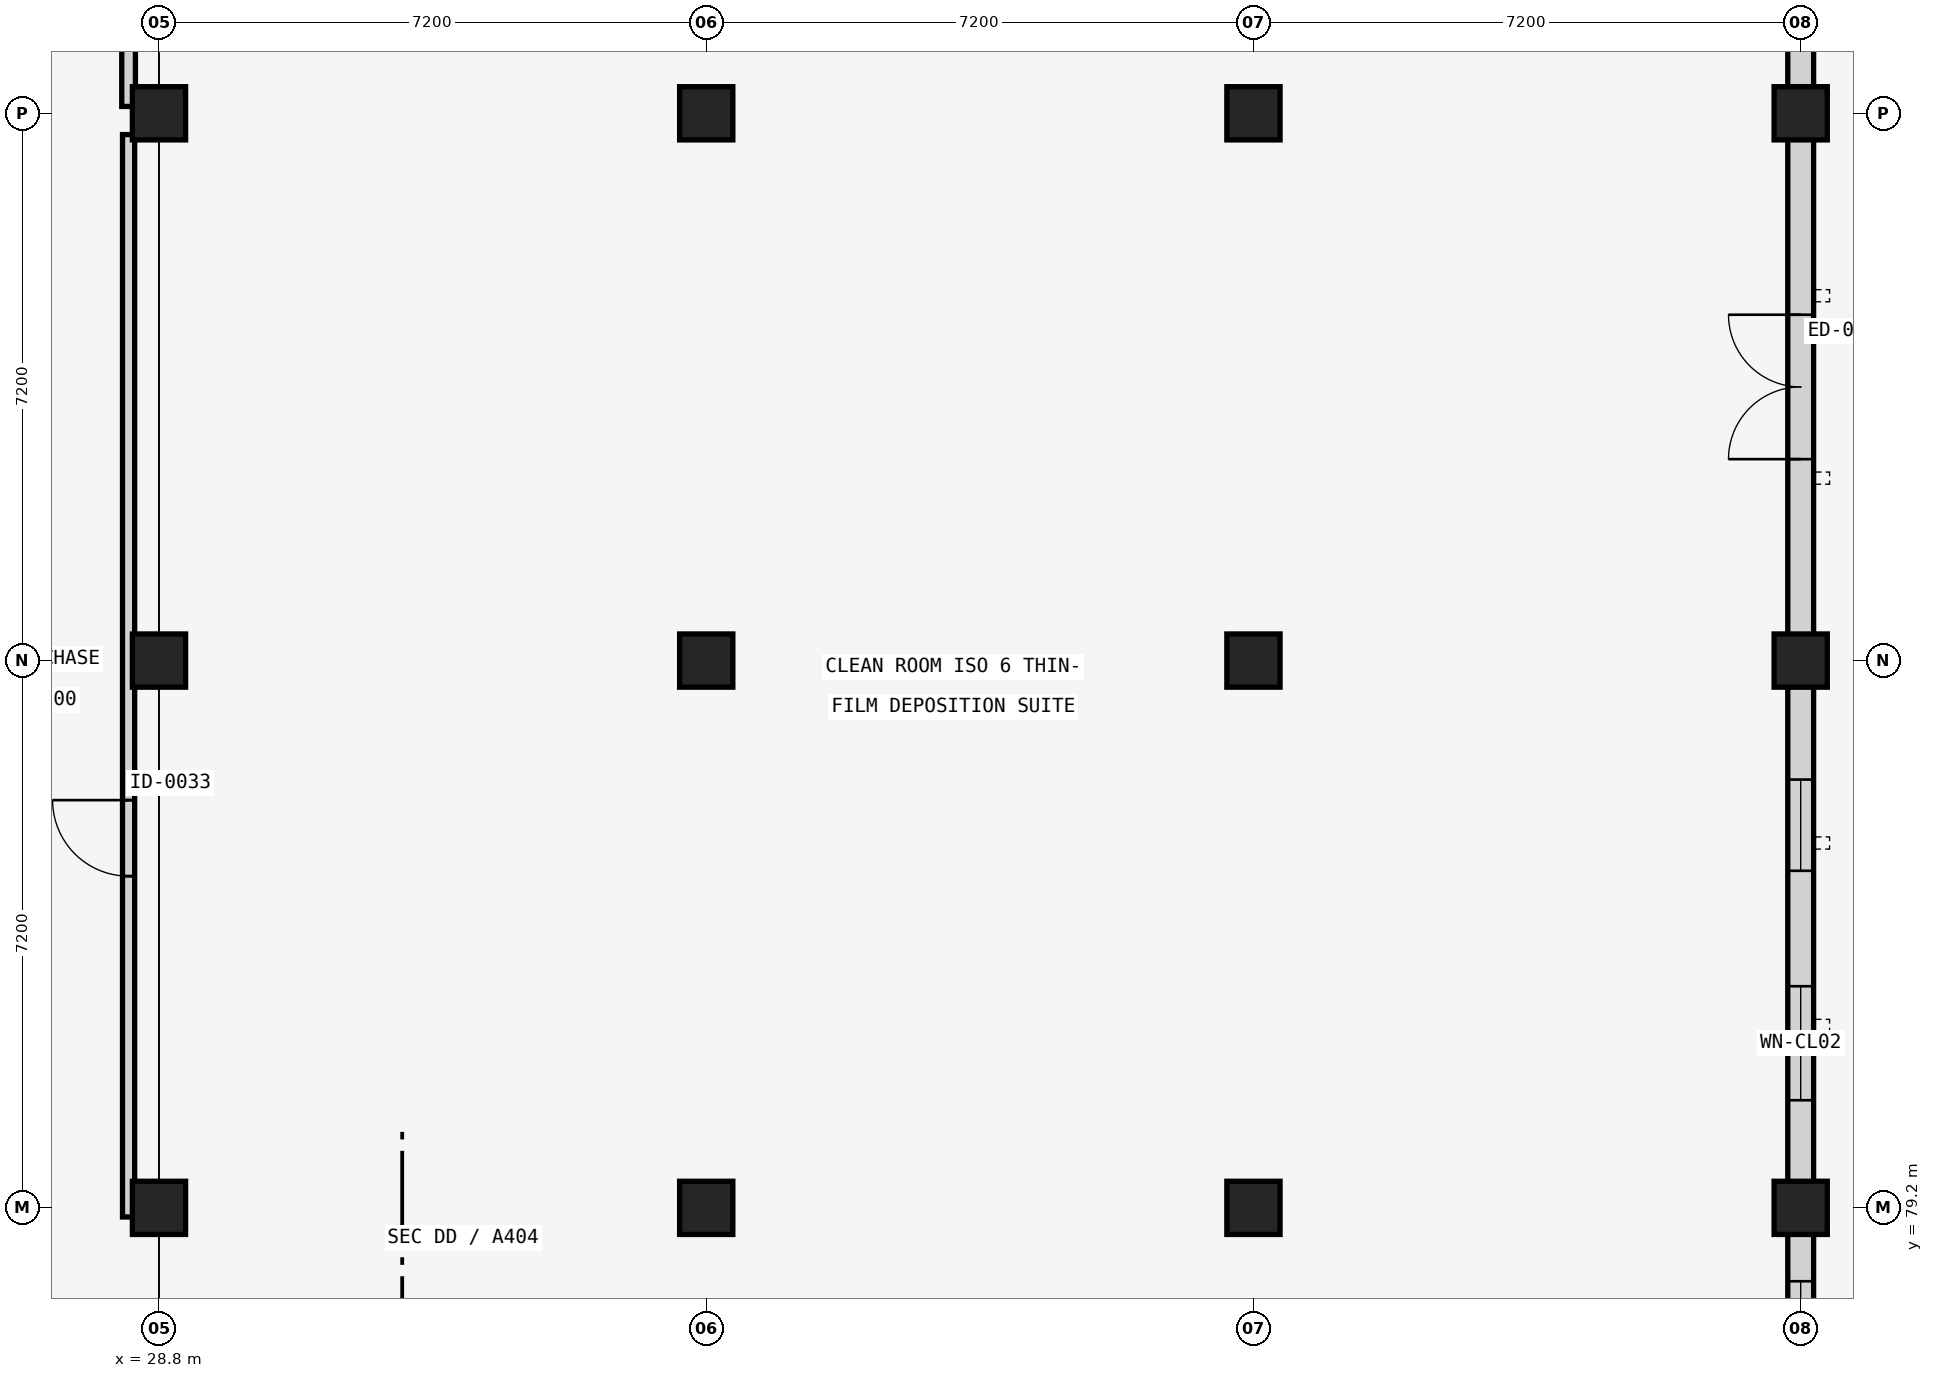
"""IFC4 building model, lengths in metres.
Left out: names, types, materials, properties, quantities, classifications, styles, units other than length and angle.
Written with IfcOpenShell. Run it as: python <this file> out.ifc"""

import sys

from ifc_helpers import new_model, si_unit, direction, frame, frame_2d, origin, origin_2d, place, context, subcontext, project, spatial, rectangle, extrude, element, fill, save


model = new_model("IFC4")
c1 = context("Model", 3, precision=1e-05, world=origin(), true_north=direction((0.0, 1.0)))
c2 = subcontext(c1, "Body", "Model", "MODEL_VIEW")
j1 = project(units=[si_unit("LENGTHUNIT", "METRE"), si_unit("PLANEANGLEUNIT", "RADIAN")], contexts=[c1])
p1 = place(None, origin())
s1 = spatial("IfcSite", under=j1, at=p1, CompositionType="ELEMENT")
p2 = place(p1, origin())
s2 = spatial("IfcBuilding", under=s1, at=p2, CompositionType="ELEMENT")
p3 = place(p2, origin())
s3 = spatial("IfcBuildingStorey", under=s2, at=p3, CompositionType="ELEMENT", Elevation=0.0)
for number, where, z_axis, x_axis in (
    (1, (28.8, 79.2, 0.0), (0.0, 0.0, 1.0), (1.0, 0.0, 0.0)),
    (2, (28.8, 86.4, 0.0), (0.0, 0.0, 1.0), (1.0, 0.0, 0.0)),
    (3, (28.8, 93.6, 0.0), (0.0, 0.0, 1.0), (1.0, 0.0, 0.0)),
    (4, (36.0, 79.2, 0.0), (0.0, 0.0, 1.0), (1.0, 0.0, 0.0)),
    (5, (36.0, 86.4, 0.0), (0.0, 0.0, 1.0), (1.0, 0.0, 0.0)),
    (6, (36.0, 93.6, 0.0), (0.0, 0.0, 1.0), (1.0, 0.0, 0.0)),
    (7, (43.2, 79.2, 0.0), (0.0, 0.0, 1.0), (1.0, 0.0, 0.0)),
    (8, (43.2, 86.4, 0.0), (0.0, 0.0, 1.0), (1.0, 0.0, 0.0)),
    (9, (43.2, 93.6, 0.0), (0.0, 0.0, 1.0), (1.0, 0.0, 0.0)),
    (10, (50.4, 79.2, 0.0), (0.0, 0.0, 1.0), (1.0, 0.0, 0.0)),
    (11, (50.4, 86.4, 0.0), (0.0, 0.0, 1.0), (1.0, 0.0, 0.0)),
    (12, (50.4, 93.6, 0.0), (0.0, 0.0, 1.0), (1.0, 0.0, 0.0)),
):
    element("IfcColumn", number, at=place(p3, frame(where, z_axis=z_axis, x_axis=x_axis)), inside=s3, PredefinedType="COLUMN", context=c2, shape_type="SweptSolid", body=[
        extrude(rectangle(XDim=0.7, YDim=0.7, at=origin_2d()), origin(), (0.0, 0.0, 1.0), 4.8),
    ])
p4 = place(p3, frame((50.4, 72.34, 0.0), z_axis=(0.0, 0.0, 1.0), x_axis=(0.0, 1.0, 0.0)))
e13 = element("IfcWall", 13, at=p4, inside=s3, PredefinedType="SOLIDWALL", context=c2, shape_type="SweptSolid", body=[
    extrude(rectangle(XDim=6.52, YDim=0.34, at=frame_2d((3.26, 0.0))), origin(), (0.0, 0.0, 1.0), 3.75),
])
p5 = place(p4, frame((1.226, 0.0, 1.0)))
e14 = element("IfcOpeningElement", 14, at=p5, cuts=e13, PredefinedType="OPENING", context=c2, shape_type="SweptSolid", body=[
    extrude(rectangle(XDim=1.2, YDim=1.5, at=frame_2d((0.6, 0.75))), frame((0.0, 0.18, 0.0), z_axis=(0.0, -1.0, 0.0), x_axis=(1.0, 0.0, 0.0)), (0.0, 0.0, 1.0), 0.36),
])
p6 = place(p4, frame((3.494, 0.0, 1.0)))
e15 = element("IfcOpeningElement", 15, at=p6, cuts=e13, PredefinedType="OPENING", context=c2, shape_type="SweptSolid", body=[
    extrude(rectangle(XDim=2.4, YDim=1.5, at=frame_2d((1.2, 0.75))), frame((0.0, 0.18, 0.0), z_axis=(0.0, -1.0, 0.0), x_axis=(1.0, 0.0, 0.0)), (0.0, 0.0, 1.0), 0.36),
])
p7 = place(p3, frame((50.4, 79.54, 0.0), z_axis=(0.0, 0.0, 1.0), x_axis=(0.0, 1.0, 0.0)))
e16 = element("IfcWall", 16, at=p7, inside=s3, PredefinedType="SOLIDWALL", context=c2, shape_type="SweptSolid", body=[
    extrude(rectangle(XDim=6.52, YDim=0.34, at=frame_2d((3.26, 0.0))), origin(), (0.0, 0.0, 1.0), 3.75),
])
p8 = place(p7, frame((1.076, 0.0, 1.0)))
e17 = element("IfcOpeningElement", 17, at=p8, cuts=e16, PredefinedType="OPENING", context=c2, shape_type="SweptSolid", body=[
    extrude(rectangle(XDim=1.5, YDim=1.5, at=frame_2d((0.75, 0.75))), frame((0.0, 0.18, 0.0), z_axis=(0.0, -1.0, 0.0), x_axis=(1.0, 0.0, 0.0)), (0.0, 0.0, 1.0), 0.36),
])
p9 = place(p7, frame((4.094, 0.0, 1.0)))
e18 = element("IfcOpeningElement", 18, at=p9, cuts=e16, PredefinedType="OPENING", context=c2, shape_type="SweptSolid", body=[
    extrude(rectangle(XDim=1.2, YDim=1.65, at=frame_2d((0.6, 0.825))), frame((0.0, 0.18, 0.0), z_axis=(0.0, -1.0, 0.0), x_axis=(1.0, 0.0, 0.0)), (0.0, 0.0, 1.0), 0.36),
])
p10 = place(p3, frame((50.4, 86.74, 0.0), z_axis=(0.0, 0.0, 1.0), x_axis=(0.0, 1.0, 0.0)))
e19 = element("IfcWall", 19, at=p10, inside=s3, PredefinedType="SOLIDWALL", context=c2, shape_type="SweptSolid", body=[
    extrude(rectangle(XDim=6.52, YDim=0.34, at=frame_2d((3.26, 0.0))), origin(), (0.0, 0.0, 1.0), 3.75),
])
p11 = place(p10, frame((2.31, 0.0, 0.0)))
e20 = element("IfcOpeningElement", 20, at=p11, cuts=e19, PredefinedType="OPENING", context=c2, shape_type="SweptSolid", body=[
    extrude(rectangle(XDim=1.9, YDim=2.35, at=frame_2d((0.95, 1.175))), frame((0.0, 0.18, 0.0), z_axis=(0.0, -1.0, 0.0), x_axis=(1.0, 0.0, 0.0)), (0.0, 0.0, 1.0), 0.36),
])
p12 = place(p3, frame((50.4, 93.94, 0.0), z_axis=(0.0, 0.0, 1.0), x_axis=(0.0, 1.0, 0.0)))
e21 = element("IfcWall", 21, at=p12, inside=s3, PredefinedType="SOLIDWALL", context=c2, shape_type="SweptSolid", body=[
    extrude(rectangle(XDim=6.52, YDim=0.34, at=frame_2d((3.26, 0.0))), origin(), (0.0, 0.0, 1.0), 3.75),
])
p13 = place(p12, frame((0.776, 0.0, 1.0)))
e22 = element("IfcOpeningElement", 22, at=p13, cuts=e21, PredefinedType="OPENING", context=c2, shape_type="SweptSolid", body=[
    extrude(rectangle(XDim=2.1, YDim=1.5, at=frame_2d((1.05, 0.75))), frame((0.0, 0.18, 0.0), z_axis=(0.0, -1.0, 0.0), x_axis=(1.0, 0.0, 0.0)), (0.0, 0.0, 1.0), 0.36),
])
p14 = place(p12, frame((3.794, 0.0, 1.0)))
e23 = element("IfcOpeningElement", 23, at=p14, cuts=e21, PredefinedType="OPENING", context=c2, shape_type="SweptSolid", body=[
    extrude(rectangle(XDim=1.8, YDim=1.65, at=frame_2d((0.9, 0.825))), frame((0.0, 0.18, 0.0), z_axis=(0.0, -1.0, 0.0), x_axis=(1.0, 0.0, 0.0)), (0.0, 0.0, 1.0), 0.36),
])
p15 = place(p3, frame((28.4, 79.08, 0.0), z_axis=(0.0, 0.0, 1.0), x_axis=(0.0, 1.0, 0.0)))
e24 = element("IfcWall", 24, at=p15, inside=s3, PredefinedType="PARTITIONING", context=c2, shape_type="SweptSolid", body=[
    extrude(rectangle(XDim=14.24, YDim=0.16, at=frame_2d((7.12, 0.0))), origin(), (0.0, 0.0, 1.0), 3.75),
])
p16 = place(p15, frame((4.484, 0.0, 0.0)))
e25 = element("IfcOpeningElement", 25, at=p16, cuts=e24, PredefinedType="OPENING", context=c2, shape_type="SweptSolid", body=[
    extrude(rectangle(XDim=1.0, YDim=2.15, at=frame_2d((0.5, 1.075))), frame((0.0, 0.09, 0.0), z_axis=(0.0, -1.0, 0.0), x_axis=(1.0, 0.0, 0.0)), (0.0, 0.0, 1.0), 0.18),
])
p17 = place(p3, frame((28.4, 93.69, 0.0), z_axis=(0.0, 0.0, 1.0), x_axis=(0.0, 1.0, 0.0)))
e26 = element("IfcWall", 26, at=p17, inside=s3, PredefinedType="PARTITIONING", context=c2, shape_type="SweptSolid", body=[
    extrude(rectangle(XDim=14.14, YDim=0.18, at=frame_2d((7.07, 0.0))), origin(), (0.0, 0.0, 1.0), 3.75),
])
p18 = place(p17, frame((4.059, 0.0, 0.0)))
e27 = element("IfcOpeningElement", 27, at=p18, cuts=e26, PredefinedType="OPENING", context=c2, shape_type="SweptSolid", body=[
    extrude(rectangle(XDim=1.78, YDim=2.26, at=frame_2d((0.89, 1.13))), frame((0.0, 0.1, 0.0), z_axis=(0.0, -1.0, 0.0), x_axis=(1.0, 0.0, 0.0)), (0.0, 0.0, 1.0), 0.2),
])
p19 = place(p6, origin())
e28 = element("IfcWindow", 28, at=p19, inside=s3, PartitioningType="SINGLE_PANEL", PredefinedType="WINDOW", context=c2, shape_type="SweptSolid", body=[
    extrude(rectangle(XDim=2.4, YDim=1.5, at=frame_2d((1.2, 0.75))), frame((0.0, 0.03, 0.0), z_axis=(0.0, -1.0, 0.0), x_axis=(1.0, 0.0, 0.0)), (0.0, 0.0, 1.0), 0.06),
])
fill(e15, e28)
p20 = place(p8, origin())
e29 = element("IfcWindow", 29, at=p20, inside=s3, PartitioningType="SINGLE_PANEL", PredefinedType="WINDOW", context=c2, shape_type="SweptSolid", body=[
    extrude(rectangle(XDim=1.5, YDim=1.5, at=frame_2d((0.75, 0.75))), frame((0.0, 0.03, 0.0), z_axis=(0.0, -1.0, 0.0), x_axis=(1.0, 0.0, 0.0)), (0.0, 0.0, 1.0), 0.06),
])
fill(e17, e29)
p21 = place(p9, origin())
e30 = element("IfcWindow", 30, at=p21, inside=s3, PartitioningType="SINGLE_PANEL", PredefinedType="WINDOW", context=c2, shape_type="SweptSolid", body=[
    extrude(rectangle(XDim=1.2, YDim=1.65, at=frame_2d((0.6, 0.825))), frame((0.0, 0.03, 0.0), z_axis=(0.0, -1.0, 0.0), x_axis=(1.0, 0.0, 0.0)), (0.0, 0.0, 1.0), 0.06),
])
fill(e18, e30)
p22 = place(p11, frame((1.9, 0.0, 0.0), z_axis=(0.0, 0.0, 1.0), x_axis=(-1.0, 0.0, 0.0)))
e31 = element("IfcDoor", 31, at=p22, inside=s3, OperationType="DOUBLE_DOOR_SINGLE_SWING", PredefinedType="DOOR", context=c2, shape_type="SweptSolid", body=[
    extrude(rectangle(XDim=1.9, YDim=2.35, at=frame_2d((0.95, 1.175))), frame((0.0, 0.025, 0.0), z_axis=(0.0, -1.0, 0.0), x_axis=(1.0, 0.0, 0.0)), (0.0, 0.0, 1.0), 0.05),
])
fill(e20, e31)
p23 = place(p16, origin())
e32 = element("IfcDoor", 32, at=p23, inside=s3, OperationType="SINGLE_SWING_RIGHT", PredefinedType="DOOR", context=c2, shape_type="SweptSolid", body=[
    extrude(rectangle(XDim=1.0, YDim=2.15, at=frame_2d((0.5, 1.075))), frame((0.0, 0.025, 0.0), z_axis=(0.0, -1.0, 0.0), x_axis=(1.0, 0.0, 0.0)), (0.0, 0.0, 1.0), 0.05),
])
fill(e25, e32)
save(model, sys.argv[1])
